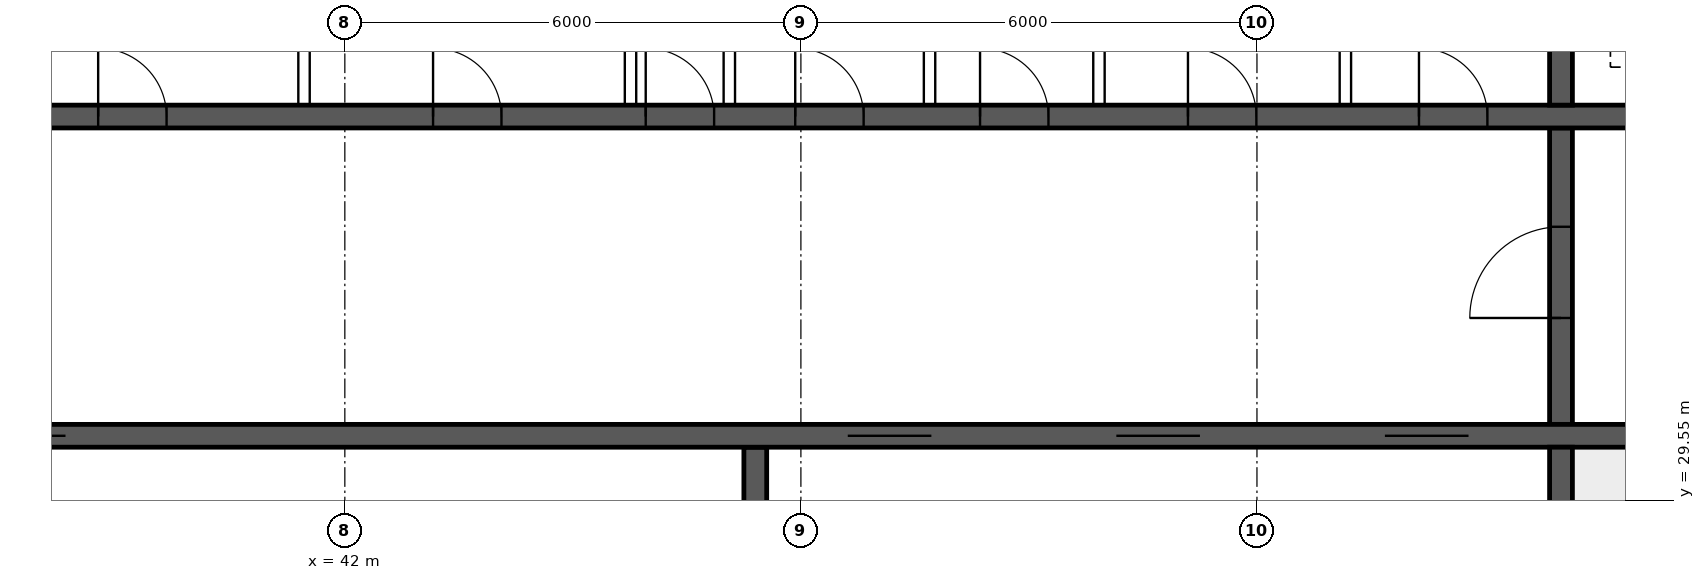
"""IFC4 building model, lengths in metres.
Left out: names, types, materials, properties, quantities, classifications, styles, units other than length and angle.
Written with IfcOpenShell. Run it as: python <this file> out.ifc"""

import sys

from ifc_helpers import new_model, si_unit, direction, frame, frame_2d, origin, place, context, subcontext, project, spatial, rectangle, extrude, element, fill, save


model = new_model("IFC4")
c1 = context("Model", 3, precision=1e-05, world=origin(), true_north=direction((0.0, 1.0)))
c2 = subcontext(c1, "Body", "Model", "MODEL_VIEW")
j1 = project(units=[si_unit("LENGTHUNIT", "METRE"), si_unit("PLANEANGLEUNIT", "RADIAN")], contexts=[c1])
p1 = place(None, origin())
s1 = spatial("IfcSite", under=j1, at=p1, CompositionType="ELEMENT")
p2 = place(p1, origin())
s2 = spatial("IfcBuilding", under=s1, at=p2, CompositionType="ELEMENT")
p3 = place(p2, frame((0.0, 0.0, 76.15)))
s3 = spatial("IfcBuildingStorey", under=s2, at=p3, CompositionType="ELEMENT", Elevation=76.15)
p4 = place(p3, frame((18.475, 30.4, 0.0), z_axis=(0.0, 0.0, 1.0), x_axis=(1.0, 0.0, 0.0)))
e1 = element("IfcWall", 1, at=p4, inside=s3, PredefinedType="SHEAR", context=c2, shape_type="SweptSolid", body=[
    extrude(rectangle(XDim=47.05, YDim=0.3, at=frame_2d((23.525, 0.0))), origin(), (0.0, 0.0, 1.0), 4.5),
])
p5 = place(p4, frame((0.4, 0.0, 0.0)))
e2 = element("IfcOpeningElement", 2, at=p5, cuts=e1, PredefinedType="OPENING", context=c2, shape_type="SweptSolid", body=[
    extrude(rectangle(XDim=1.0, YDim=2.1, at=frame_2d((0.5, 1.05))), frame((0.0, 0.16, 0.0), z_axis=(0.0, -1.0, 0.0), x_axis=(1.0, 0.0, 0.0)), (0.0, 0.0, 1.0), 0.32),
])
p6 = place(p4, frame((45.65, 0.0, 0.0)))
e3 = element("IfcOpeningElement", 3, at=p6, cuts=e1, PredefinedType="OPENING", context=c2, shape_type="SweptSolid", body=[
    extrude(rectangle(XDim=1.0, YDim=2.1, at=frame_2d((0.5, 1.05))), frame((0.0, 0.16, 0.0), z_axis=(0.0, -1.0, 0.0), x_axis=(1.0, 0.0, 0.0)), (0.0, 0.0, 1.0), 0.32),
])
p7 = place(p4, frame((8.275, 0.0, 0.0)))
e4 = element("IfcOpeningElement", 4, at=p7, cuts=e1, PredefinedType="OPENING", context=c2, shape_type="SweptSolid", body=[
    extrude(rectangle(XDim=1.1, YDim=2.1, at=frame_2d((0.55, 1.05))), frame((0.0, 0.16, 0.0), z_axis=(0.0, -1.0, 0.0), x_axis=(1.0, 0.0, 0.0)), (0.0, 0.0, 1.0), 0.32),
])
p8 = place(p4, frame((10.875, 0.0, 0.0)))
e5 = element("IfcOpeningElement", 5, at=p8, cuts=e1, PredefinedType="OPENING", context=c2, shape_type="SweptSolid", body=[
    extrude(rectangle(XDim=1.1, YDim=2.1, at=frame_2d((0.55, 1.05))), frame((0.0, 0.16, 0.0), z_axis=(0.0, -1.0, 0.0), x_axis=(1.0, 0.0, 0.0)), (0.0, 0.0, 1.0), 0.32),
])
p9 = place(p4, frame((13.475, 0.0, 0.0)))
e6 = element("IfcOpeningElement", 6, at=p9, cuts=e1, PredefinedType="OPENING", context=c2, shape_type="SweptSolid", body=[
    extrude(rectangle(XDim=1.1, YDim=2.1, at=frame_2d((0.55, 1.05))), frame((0.0, 0.16, 0.0), z_axis=(0.0, -1.0, 0.0), x_axis=(1.0, 0.0, 0.0)), (0.0, 0.0, 1.0), 0.32),
])
p10 = place(p4, frame((16.075, 0.0, 0.0)))
e7 = element("IfcOpeningElement", 7, at=p10, cuts=e1, PredefinedType="OPENING", context=c2, shape_type="SweptSolid", body=[
    extrude(rectangle(XDim=1.1, YDim=2.1, at=frame_2d((0.55, 1.05))), frame((0.0, 0.16, 0.0), z_axis=(0.0, -1.0, 0.0), x_axis=(1.0, 0.0, 0.0)), (0.0, 0.0, 1.0), 0.32),
])
p11 = place(p4, frame((18.75, 0.0, 0.0)))
e8 = element("IfcOpeningElement", 8, at=p11, cuts=e1, PredefinedType="OPENING", context=c2, shape_type="SweptSolid", body=[
    extrude(rectangle(XDim=1.1, YDim=2.1, at=frame_2d((0.55, 1.05))), frame((0.0, 0.16, 0.0), z_axis=(0.0, -1.0, 0.0), x_axis=(1.0, 0.0, 0.0)), (0.0, 0.0, 1.0), 0.32),
])
p12 = place(p4, frame((30.142, 0.0, 0.0)))
e9 = element("IfcOpeningElement", 9, at=p12, cuts=e1, PredefinedType="OPENING", context=c2, shape_type="SweptSolid", body=[
    extrude(rectangle(XDim=1.1, YDim=2.1, at=frame_2d((0.55, 1.05))), frame((0.0, 0.16, 0.0), z_axis=(0.0, -1.0, 0.0), x_axis=(1.0, 0.0, 0.0)), (0.0, 0.0, 1.0), 0.32),
])
p13 = place(p4, frame((33.675, 0.0, 0.0)))
e10 = element("IfcOpeningElement", 10, at=p13, cuts=e1, PredefinedType="OPENING", context=c2, shape_type="SweptSolid", body=[
    extrude(rectangle(XDim=1.1, YDim=2.1, at=frame_2d((0.55, 1.05))), frame((0.0, 0.16, 0.0), z_axis=(0.0, -1.0, 0.0), x_axis=(1.0, 0.0, 0.0)), (0.0, 0.0, 1.0), 0.32),
])
p14 = place(p4, frame((37.208, 0.0, 0.0)))
e11 = element("IfcOpeningElement", 11, at=p14, cuts=e1, PredefinedType="OPENING", context=c2, shape_type="SweptSolid", body=[
    extrude(rectangle(XDim=1.1, YDim=2.1, at=frame_2d((0.55, 1.05))), frame((0.0, 0.16, 0.0), z_axis=(0.0, -1.0, 0.0), x_axis=(1.0, 0.0, 0.0)), (0.0, 0.0, 1.0), 0.32),
])
p15 = place(p3, frame((18.475, 34.6, 0.0), z_axis=(0.0, 0.0, 1.0), x_axis=(1.0, 0.0, 0.0)))
e12 = element("IfcWall", 12, at=p15, inside=s3, PredefinedType="SHEAR", context=c2, shape_type="SweptSolid", body=[
    extrude(rectangle(XDim=47.05, YDim=0.3, at=frame_2d((23.525, 0.0))), origin(), (0.0, 0.0, 1.0), 4.5),
])
p16 = place(p15, frame((0.9, 0.0, 0.0)))
e13 = element("IfcOpeningElement", 13, at=p16, cuts=e12, PredefinedType="OPENING", context=c2, shape_type="SweptSolid", body=[
    extrude(rectangle(XDim=1.1, YDim=2.1, at=frame_2d((0.55, 1.05))), frame((0.0, 0.16, 0.0), z_axis=(0.0, -1.0, 0.0), x_axis=(1.0, 0.0, 0.0)), (0.0, 0.0, 1.0), 0.32),
])
p17 = place(p15, frame((45.05, 0.0, 0.0)))
e14 = element("IfcOpeningElement", 14, at=p17, cuts=e12, PredefinedType="OPENING", context=c2, shape_type="SweptSolid", body=[
    extrude(rectangle(XDim=1.1, YDim=2.1, at=frame_2d((0.55, 1.05))), frame((0.0, 0.16, 0.0), z_axis=(0.0, -1.0, 0.0), x_axis=(1.0, 0.0, 0.0)), (0.0, 0.0, 1.0), 0.32),
])
p18 = place(p15, frame((4.125, 0.0, 0.0)))
e15 = element("IfcOpeningElement", 15, at=p18, cuts=e12, PredefinedType="OPENING", context=c2, shape_type="SweptSolid", body=[
    extrude(rectangle(XDim=0.9, YDim=2.1, at=frame_2d((0.45, 1.05))), frame((0.0, 0.16, 0.0), z_axis=(0.0, -1.0, 0.0), x_axis=(1.0, 0.0, 0.0)), (0.0, 0.0, 1.0), 0.32),
])
p19 = place(p15, frame((42.025, 0.0, 0.0)))
e16 = element("IfcOpeningElement", 16, at=p19, cuts=e12, PredefinedType="OPENING", context=c2, shape_type="SweptSolid", body=[
    extrude(rectangle(XDim=0.9, YDim=2.1, at=frame_2d((0.45, 1.05))), frame((0.0, 0.16, 0.0), z_axis=(0.0, -1.0, 0.0), x_axis=(1.0, 0.0, 0.0)), (0.0, 0.0, 1.0), 0.32),
])
p20 = place(p15, frame((8.9, 0.0, 0.0)))
e17 = element("IfcOpeningElement", 17, at=p20, cuts=e12, PredefinedType="OPENING", context=c2, shape_type="SweptSolid", body=[
    extrude(rectangle(XDim=0.9, YDim=2.1, at=frame_2d((0.45, 1.05))), frame((0.0, 0.16, 0.0), z_axis=(0.0, -1.0, 0.0), x_axis=(1.0, 0.0, 0.0)), (0.0, 0.0, 1.0), 0.32),
])
p21 = place(p15, frame((12.874, 0.0, 0.0)))
e18 = element("IfcOpeningElement", 18, at=p21, cuts=e12, PredefinedType="OPENING", context=c2, shape_type="SweptSolid", body=[
    extrude(rectangle(XDim=0.9, YDim=2.1, at=frame_2d((0.45, 1.05))), frame((0.0, 0.16, 0.0), z_axis=(0.0, -1.0, 0.0), x_axis=(1.0, 0.0, 0.0)), (0.0, 0.0, 1.0), 0.32),
])
p22 = place(p15, frame((16.521, 0.0, 0.0)))
e19 = element("IfcOpeningElement", 19, at=p22, cuts=e12, PredefinedType="OPENING", context=c2, shape_type="SweptSolid", body=[
    extrude(rectangle(XDim=0.9, YDim=2.1, at=frame_2d((0.45, 1.05))), frame((0.0, 0.16, 0.0), z_axis=(0.0, -1.0, 0.0), x_axis=(1.0, 0.0, 0.0)), (0.0, 0.0, 1.0), 0.32),
])
p23 = place(p15, frame((20.28, 0.0, 0.0)))
e20 = element("IfcOpeningElement", 20, at=p23, cuts=e12, PredefinedType="OPENING", context=c2, shape_type="SweptSolid", body=[
    extrude(rectangle(XDim=0.9, YDim=2.1, at=frame_2d((0.45, 1.05))), frame((0.0, 0.16, 0.0), z_axis=(0.0, -1.0, 0.0), x_axis=(1.0, 0.0, 0.0)), (0.0, 0.0, 1.0), 0.32),
])
p24 = place(p15, frame((24.686, 0.0, 0.0)))
e21 = element("IfcOpeningElement", 21, at=p24, cuts=e12, PredefinedType="OPENING", context=c2, shape_type="SweptSolid", body=[
    extrude(rectangle(XDim=0.9, YDim=2.1, at=frame_2d((0.45, 1.05))), frame((0.0, 0.16, 0.0), z_axis=(0.0, -1.0, 0.0), x_axis=(1.0, 0.0, 0.0)), (0.0, 0.0, 1.0), 0.32),
])
p25 = place(p15, frame((27.483, 0.0, 0.0)))
e22 = element("IfcOpeningElement", 22, at=p25, cuts=e12, PredefinedType="OPENING", context=c2, shape_type="SweptSolid", body=[
    extrude(rectangle(XDim=0.9, YDim=2.1, at=frame_2d((0.45, 1.05))), frame((0.0, 0.16, 0.0), z_axis=(0.0, -1.0, 0.0), x_axis=(1.0, 0.0, 0.0)), (0.0, 0.0, 1.0), 0.32),
])
p26 = place(p15, frame((29.45, 0.0, 0.0)))
e23 = element("IfcOpeningElement", 23, at=p26, cuts=e12, PredefinedType="OPENING", context=c2, shape_type="SweptSolid", body=[
    extrude(rectangle(XDim=0.9, YDim=2.1, at=frame_2d((0.45, 1.05))), frame((0.0, 0.16, 0.0), z_axis=(0.0, -1.0, 0.0), x_axis=(1.0, 0.0, 0.0)), (0.0, 0.0, 1.0), 0.32),
])
p27 = place(p15, frame((31.882, 0.0, 0.0)))
e24 = element("IfcOpeningElement", 24, at=p27, cuts=e12, PredefinedType="OPENING", context=c2, shape_type="SweptSolid", body=[
    extrude(rectangle(XDim=0.9, YDim=2.1, at=frame_2d((0.45, 1.05))), frame((0.0, 0.16, 0.0), z_axis=(0.0, -1.0, 0.0), x_axis=(1.0, 0.0, 0.0)), (0.0, 0.0, 1.0), 0.32),
])
p28 = place(p15, frame((34.617, 0.0, 0.0)))
e25 = element("IfcOpeningElement", 25, at=p28, cuts=e12, PredefinedType="OPENING", context=c2, shape_type="SweptSolid", body=[
    extrude(rectangle(XDim=0.9, YDim=2.1, at=frame_2d((0.45, 1.05))), frame((0.0, 0.16, 0.0), z_axis=(0.0, -1.0, 0.0), x_axis=(1.0, 0.0, 0.0)), (0.0, 0.0, 1.0), 0.32),
])
p29 = place(p15, frame((37.656, 0.0, 0.0)))
e26 = element("IfcOpeningElement", 26, at=p29, cuts=e12, PredefinedType="OPENING", context=c2, shape_type="SweptSolid", body=[
    extrude(rectangle(XDim=0.9, YDim=2.1, at=frame_2d((0.45, 1.05))), frame((0.0, 0.16, 0.0), z_axis=(0.0, -1.0, 0.0), x_axis=(1.0, 0.0, 0.0)), (0.0, 0.0, 1.0), 0.32),
])
p30 = place(p3, frame((58.0, 26.275, 0.0), z_axis=(0.0, 0.0, 1.0), x_axis=(0.0, 1.0, 0.0)))
e27 = element("IfcWall", 27, at=p30, inside=s3, PredefinedType="SHEAR", context=c2, shape_type="SweptSolid", body=[
    extrude(rectangle(XDim=3.975, YDim=0.3, at=frame_2d((1.988, 0.0))), origin(), (0.0, 0.0, 1.0), 4.5),
])
p31 = place(p3, frame((58.0, 30.55, 0.0), z_axis=(0.0, 0.0, 1.0), x_axis=(0.0, 1.0, 0.0)))
e28 = element("IfcWall", 28, at=p31, inside=s3, PredefinedType="SHEAR", context=c2, shape_type="SweptSolid", body=[
    extrude(rectangle(XDim=3.9, YDim=0.3, at=frame_2d((1.95, 0.0))), origin(), (0.0, 0.0, 1.0), 4.5),
])
p32 = place(p31, frame((1.4, 0.0, 0.0)))
e29 = element("IfcOpeningElement", 29, at=p32, cuts=e28, PredefinedType="OPENING", context=c2, shape_type="SweptSolid", body=[
    extrude(rectangle(XDim=1.2, YDim=2.1, at=frame_2d((0.6, 1.05))), frame((0.0, 0.16, 0.0), z_axis=(0.0, -1.0, 0.0), x_axis=(1.0, 0.0, 0.0)), (0.0, 0.0, 1.0), 0.32),
])
p33 = place(p3, frame((58.0, 34.75, 0.0), z_axis=(0.0, 0.0, 1.0), x_axis=(0.0, 1.0, 0.0)))
e30 = element("IfcWall", 30, at=p33, inside=s3, PredefinedType="SHEAR", context=c2, shape_type="SweptSolid", body=[
    extrude(rectangle(XDim=2.975, YDim=0.3, at=frame_2d((1.488, 0.0))), origin(), (0.0, 0.0, 1.0), 4.5),
])
p34 = place(p3, frame((47.4, 26.275, 0.0), z_axis=(0.0, 0.0, 1.0), x_axis=(0.0, 1.0, 0.0)))
e31 = element("IfcWall", 31, at=p34, inside=s3, PredefinedType="SHEAR", context=c2, shape_type="SweptSolid", body=[
    extrude(rectangle(XDim=3.975, YDim=0.3, at=frame_2d((1.988, 0.0))), origin(), (0.0, 0.0, 1.0), 4.5),
])
for number, where, z_axis, x_axis in (
    (32, (41.463, 34.75, 0.0), (0.0, 0.0, 1.0), (0.0, 1.0, 0.0)),
    (33, (45.758, 34.75, 0.0), (0.0, 0.0, 1.0), (0.0, 1.0, 0.0)),
    (34, (47.058, 34.75, 0.0), (0.0, 0.0, 1.0), (0.0, 1.0, 0.0)),
    (35, (49.692, 34.75, 0.0), (0.0, 0.0, 1.0), (0.0, 1.0, 0.0)),
    (36, (51.921, 34.75, 0.0), (0.0, 0.0, 1.0), (0.0, 1.0, 0.0)),
    (37, (55.163, 34.75, 0.0), (0.0, 0.0, 1.0), (0.0, 1.0, 0.0)),
):
    element("IfcWall", number, at=place(p3, frame(where, z_axis=z_axis, x_axis=x_axis)), inside=s3, PredefinedType="SOLIDWALL", context=c2, shape_type="SweptSolid", body=[
        extrude(rectangle(XDim=2.975, YDim=0.15, at=frame_2d((1.488, 0.0))), origin(), (0.0, 0.0, 1.0), 4.25),
    ])
p35 = place(p32, origin())
e38 = element("IfcDoor", 38, at=p35, inside=s3, OperationType="SINGLE_SWING_LEFT", PredefinedType="DOOR", context=c2, shape_type="SweptSolid", body=[
    extrude(rectangle(XDim=1.2, YDim=2.1, at=frame_2d((0.6, 1.05))), frame((0.0, 0.025, 0.0), z_axis=(0.0, -1.0, 0.0), x_axis=(1.0, 0.0, 0.0)), (0.0, 0.0, 1.0), 0.05),
])
fill(e29, e38)
p36 = place(p23, origin())
e39 = element("IfcDoor", 39, at=p36, inside=s3, OperationType="SINGLE_SWING_LEFT", PredefinedType="DOOR", context=c2, shape_type="SweptSolid", body=[
    extrude(rectangle(XDim=0.9, YDim=2.1, at=frame_2d((0.45, 1.05))), frame((0.0, 0.025, 0.0), z_axis=(0.0, -1.0, 0.0), x_axis=(1.0, 0.0, 0.0)), (0.0, 0.0, 1.0), 0.05),
])
fill(e20, e39)
p37 = place(p24, origin())
e40 = element("IfcDoor", 40, at=p37, inside=s3, OperationType="SINGLE_SWING_LEFT", PredefinedType="DOOR", context=c2, shape_type="SweptSolid", body=[
    extrude(rectangle(XDim=0.9, YDim=2.1, at=frame_2d((0.45, 1.05))), frame((0.0, 0.025, 0.0), z_axis=(0.0, -1.0, 0.0), x_axis=(1.0, 0.0, 0.0)), (0.0, 0.0, 1.0), 0.05),
])
fill(e21, e40)
p38 = place(p25, origin())
e41 = element("IfcDoor", 41, at=p38, inside=s3, OperationType="SINGLE_SWING_LEFT", PredefinedType="DOOR", context=c2, shape_type="SweptSolid", body=[
    extrude(rectangle(XDim=0.9, YDim=2.1, at=frame_2d((0.45, 1.05))), frame((0.0, 0.025, 0.0), z_axis=(0.0, -1.0, 0.0), x_axis=(1.0, 0.0, 0.0)), (0.0, 0.0, 1.0), 0.05),
])
fill(e22, e41)
p39 = place(p26, origin())
e42 = element("IfcDoor", 42, at=p39, inside=s3, OperationType="SINGLE_SWING_LEFT", PredefinedType="DOOR", context=c2, shape_type="SweptSolid", body=[
    extrude(rectangle(XDim=0.9, YDim=2.1, at=frame_2d((0.45, 1.05))), frame((0.0, 0.025, 0.0), z_axis=(0.0, -1.0, 0.0), x_axis=(1.0, 0.0, 0.0)), (0.0, 0.0, 1.0), 0.05),
])
fill(e23, e42)
p40 = place(p27, origin())
e43 = element("IfcDoor", 43, at=p40, inside=s3, OperationType="SINGLE_SWING_LEFT", PredefinedType="DOOR", context=c2, shape_type="SweptSolid", body=[
    extrude(rectangle(XDim=0.9, YDim=2.1, at=frame_2d((0.45, 1.05))), frame((0.0, 0.025, 0.0), z_axis=(0.0, -1.0, 0.0), x_axis=(1.0, 0.0, 0.0)), (0.0, 0.0, 1.0), 0.05),
])
fill(e24, e43)
p41 = place(p28, origin())
e44 = element("IfcDoor", 44, at=p41, inside=s3, OperationType="SINGLE_SWING_LEFT", PredefinedType="DOOR", context=c2, shape_type="SweptSolid", body=[
    extrude(rectangle(XDim=0.9, YDim=2.1, at=frame_2d((0.45, 1.05))), frame((0.0, 0.025, 0.0), z_axis=(0.0, -1.0, 0.0), x_axis=(1.0, 0.0, 0.0)), (0.0, 0.0, 1.0), 0.05),
])
fill(e25, e44)
p42 = place(p29, origin())
e45 = element("IfcDoor", 45, at=p42, inside=s3, OperationType="SINGLE_SWING_LEFT", PredefinedType="DOOR", context=c2, shape_type="SweptSolid", body=[
    extrude(rectangle(XDim=0.9, YDim=2.1, at=frame_2d((0.45, 1.05))), frame((0.0, 0.025, 0.0), z_axis=(0.0, -1.0, 0.0), x_axis=(1.0, 0.0, 0.0)), (0.0, 0.0, 1.0), 0.05),
])
fill(e26, e45)
p43 = place(p11, origin())
e46 = element("IfcDoor", 46, at=p43, inside=s3, OperationType="DOUBLE_DOOR_SLIDING", PredefinedType="DOOR", context=c2, shape_type="SweptSolid", body=[
    extrude(rectangle(XDim=1.1, YDim=2.1, at=frame_2d((0.55, 1.05))), frame((0.0, 0.025, 0.0), z_axis=(0.0, -1.0, 0.0), x_axis=(1.0, 0.0, 0.0)), (0.0, 0.0, 1.0), 0.05),
])
fill(e8, e46)
p44 = place(p12, origin())
e47 = element("IfcDoor", 47, at=p44, inside=s3, OperationType="DOUBLE_DOOR_SLIDING", PredefinedType="DOOR", context=c2, shape_type="SweptSolid", body=[
    extrude(rectangle(XDim=1.1, YDim=2.1, at=frame_2d((0.55, 1.05))), frame((0.0, 0.025, 0.0), z_axis=(0.0, -1.0, 0.0), x_axis=(1.0, 0.0, 0.0)), (0.0, 0.0, 1.0), 0.05),
])
fill(e9, e47)
p45 = place(p13, origin())
e48 = element("IfcDoor", 48, at=p45, inside=s3, OperationType="DOUBLE_DOOR_SLIDING", PredefinedType="DOOR", context=c2, shape_type="SweptSolid", body=[
    extrude(rectangle(XDim=1.1, YDim=2.1, at=frame_2d((0.55, 1.05))), frame((0.0, 0.025, 0.0), z_axis=(0.0, -1.0, 0.0), x_axis=(1.0, 0.0, 0.0)), (0.0, 0.0, 1.0), 0.05),
])
fill(e10, e48)
p46 = place(p14, origin())
e49 = element("IfcDoor", 49, at=p46, inside=s3, OperationType="DOUBLE_DOOR_SLIDING", PredefinedType="DOOR", context=c2, shape_type="SweptSolid", body=[
    extrude(rectangle(XDim=1.1, YDim=2.1, at=frame_2d((0.55, 1.05))), frame((0.0, 0.025, 0.0), z_axis=(0.0, -1.0, 0.0), x_axis=(1.0, 0.0, 0.0)), (0.0, 0.0, 1.0), 0.05),
])
fill(e11, e49)
save(model, sys.argv[1])
